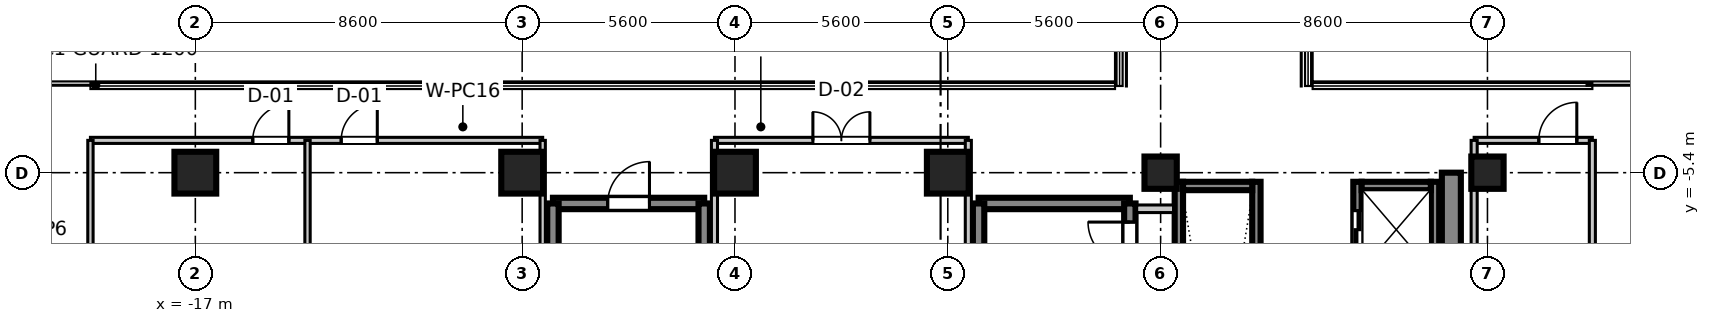
"""IFC4 building model, lengths in metres.
Left out: names, types, materials, properties, quantities, classifications, styles, units other than length and angle.
Written with IfcOpenShell. Run it as: python <this file> out.ifc"""

import sys

from ifc_helpers import new_model, si_unit, direction, frame, frame_2d, origin, origin_2d, place, context, subcontext, project, spatial, rectangle, extrude, source, transform, mapped, element, fill, save


model = new_model("IFC4")
c1 = context("Model", 3, precision=1e-05, world=origin(), true_north=direction((0.0, 1.0)))
c2 = subcontext(c1, "Body", "Model", "MODEL_VIEW")
j1 = project(units=[si_unit("LENGTHUNIT", "METRE"), si_unit("PLANEANGLEUNIT", "RADIAN")], contexts=[c1])
p1 = place(None, origin())
s1 = spatial("IfcSite", under=j1, at=p1, CompositionType="ELEMENT")
p2 = place(p1, origin())
s2 = spatial("IfcBuilding", under=s1, at=p2, CompositionType="ELEMENT")
p3 = place(p2, frame((0.0, 0.0, 185.5)))
s3 = spatial("IfcBuildingStorey", under=s2, at=p3, CompositionType="ELEMENT", Elevation=185.5)
m1 = source(origin(), c2, "Body", "SweptSolid", [
    extrude(rectangle(XDim=1.1, YDim=1.1, at=origin_2d()), origin(), (0.0, 0.0, 1.0), 3.605),
])
for number, where, z_axis, x_axis in (
    (1, (-17.0, -5.4, 0.0), (0.0, 0.0, 1.0), (1.0, 0.0, 0.0)),
    (2, (-8.4, -5.4, 0.0), (0.0, 0.0, 1.0), (1.0, 0.0, 0.0)),
    (3, (-2.8, -5.4, 0.0), (0.0, 0.0, 1.0), (1.0, 0.0, 0.0)),
    (4, (2.8, -5.4, 0.0), (0.0, 0.0, 1.0), (1.0, 0.0, 0.0)),
):
    element("IfcColumn", number, at=place(p3, frame(where, z_axis=z_axis, x_axis=x_axis)), inside=s3, PredefinedType="COLUMN", context=c2, shape_type="MappedRepresentation", body=[
        mapped(m1, transform((0.0, 0.0, 0.0), scale=1.0)),
    ])
m2 = source(origin(), c2, "Body", "SweptSolid", [
    extrude(rectangle(XDim=0.85, YDim=0.85, at=origin_2d()), origin(), (0.0, 0.0, 1.0), 3.605),
])
for number, where, z_axis, x_axis in (
    (5, (8.4, -5.4, 0.0), (0.0, 0.0, 1.0), (1.0, 0.0, 0.0)),
    (6, (17.0, -5.4, 0.0), (0.0, 0.0, 1.0), (1.0, 0.0, 0.0)),
):
    element("IfcColumn", number, at=place(p3, frame(where, z_axis=z_axis, x_axis=x_axis)), inside=s3, PredefinedType="PILASTER", context=c2, shape_type="MappedRepresentation", body=[
        mapped(m2, transform((0.0, 0.0, 0.0), scale=1.0)),
    ])
m3 = source(origin(), c2, "Body", "SweptSolid", [
    extrude(rectangle(XDim=11.6, YDim=0.5, at=frame_2d((5.8, 0.0))), origin(), (0.0, 0.0, 1.0), 3.39),
])
p4 = place(p3, frame((16.05, -17.0, 0.0), z_axis=(0.0, 0.0, 1.0), x_axis=(0.0, 1.0, 0.0)))
e7 = element("IfcWall", 7, at=p4, inside=s3, PredefinedType="SHEAR", context=c2, shape_type="MappedRepresentation", body=[
    mapped(m3, transform((0.0, 0.0, 0.0), scale=1.0)),
])
m4 = source(origin(), c2, "Body", "SweptSolid", [
    extrude(rectangle(XDim=3.98, YDim=0.3, at=frame_2d((1.99, 0.0))), origin(), (0.0, 0.0, 1.0), 3.39),
])
p5 = place(p3, frame((3.61, -6.21, 0.0), z_axis=(0.0, 0.0, 1.0), x_axis=(1.0, 0.0, 0.0)))
e8 = element("IfcWall", 8, at=p5, inside=s3, PredefinedType="SHEAR", context=c2, shape_type="MappedRepresentation", body=[
    mapped(m4, transform((0.0, 0.0, 0.0), scale=1.0)),
])
m5 = source(origin(), c2, "Body", "SweptSolid", [
    extrude(rectangle(XDim=9.38, YDim=0.3, at=frame_2d((4.69, 0.0))), origin(), (0.0, 0.0, 1.0), 3.39),
])
p6 = place(p3, frame((3.61, -15.59, 0.0), z_axis=(0.0, 0.0, 1.0), x_axis=(0.0, 1.0, 0.0)))
e9 = element("IfcWall", 9, at=p6, inside=s3, PredefinedType="SHEAR", context=c2, shape_type="MappedRepresentation", body=[
    mapped(m5, transform((0.0, 0.0, 0.0), scale=1.0)),
])
p7 = place(p3, frame((7.59, -15.59, 0.0), z_axis=(0.0, 0.0, 1.0), x_axis=(0.0, 1.0, 0.0)))
e10 = element("IfcWall", 10, at=p7, inside=s3, PredefinedType="SHEAR", context=c2, shape_type="MappedRepresentation", body=[
    mapped(m5, transform((0.0, 0.0, 0.0), scale=1.0)),
])
p8 = place(p7, frame((7.79, 0.0, 0.0)))
e11 = element("IfcOpeningElement", 11, at=p8, cuts=e10, PredefinedType="OPENING", context=c2, shape_type="SweptSolid", body=[
    extrude(rectangle(XDim=1.1, YDim=2.15, at=frame_2d((0.55, 1.075))), frame((0.0, 0.16, 0.0), z_axis=(0.0, -1.0, 0.0), x_axis=(1.0, 0.0, 0.0)), (0.0, 0.0, 1.0), 0.32),
])
p9 = place(p3, frame((-7.59, -6.21, 0.0), z_axis=(0.0, 0.0, 1.0), x_axis=(1.0, 0.0, 0.0)))
e12 = element("IfcWall", 12, at=p9, inside=s3, PredefinedType="SHEAR", context=c2, shape_type="MappedRepresentation", body=[
    mapped(m4, transform((0.0, 0.0, 0.0), scale=1.0)),
])
p10 = place(p9, frame((1.44, 0.0, 0.0)))
e13 = element("IfcOpeningElement", 13, at=p10, cuts=e12, PredefinedType="OPENING", context=c2, shape_type="SweptSolid", body=[
    extrude(rectangle(XDim=1.1, YDim=2.15, at=frame_2d((0.55, 1.075))), frame((0.0, 0.16, 0.0), z_axis=(0.0, -1.0, 0.0), x_axis=(1.0, 0.0, 0.0)), (0.0, 0.0, 1.0), 0.32),
])
for number, where, z_axis, x_axis in (
    (14, (-7.59, -15.59, 0.0), (0.0, 0.0, 1.0), (0.0, 1.0, 0.0)),
    (15, (-3.61, -15.59, 0.0), (0.0, 0.0, 1.0), (0.0, 1.0, 0.0)),
):
    element("IfcWall", number, at=place(p3, frame(where, z_axis=z_axis, x_axis=x_axis)), inside=s3, PredefinedType="SHEAR", context=c2, shape_type="MappedRepresentation", body=[
        mapped(m5, transform((0.0, 0.0, 0.0), scale=1.0)),
    ])
m6 = source(origin(), c2, "Body", "SweptSolid", [
    extrude(rectangle(XDim=2.36, YDim=0.22, at=frame_2d((1.18, 0.0))), origin(), (0.0, 0.0, 1.0), 3.39),
])
p11 = place(p3, frame((13.58, -8.0, 0.0), z_axis=(0.0, 0.0, 1.0), x_axis=(0.0, 1.0, 0.0)))
e16 = element("IfcWall", 16, at=p11, inside=s3, PredefinedType="SHEAR", context=c2, shape_type="MappedRepresentation", body=[
    mapped(m6, transform((0.0, 0.0, 0.0), scale=1.0)),
])
p12 = place(p11, frame((0.6, 0.0, 0.0)))
e17 = element("IfcOpeningElement", 17, at=p12, cuts=e16, PredefinedType="OPENING", context=c2, shape_type="SweptSolid", body=[
    extrude(rectangle(XDim=1.0, YDim=2.2, at=frame_2d((0.5, 1.1))), frame((0.0, 0.12, 0.0), z_axis=(0.0, -1.0, 0.0), x_axis=(1.0, 0.0, 0.0)), (0.0, 0.0, 1.0), 0.24),
])
p13 = place(p3, frame((15.62, -8.0, 0.0), z_axis=(0.0, 0.0, 1.0), x_axis=(0.0, 1.0, 0.0)))
e18 = element("IfcWall", 18, at=p13, inside=s3, PredefinedType="SHEAR", context=c2, shape_type="MappedRepresentation", body=[
    mapped(m6, transform((0.0, 0.0, 0.0), scale=1.0)),
])
m7 = source(origin(), c2, "Body", "SweptSolid", [
    extrude(rectangle(XDim=1.82, YDim=0.22, at=frame_2d((0.91, 0.0))), origin(), (0.0, 0.0, 1.0), 3.39),
])
p14 = place(p3, frame((13.69, -5.75, 0.0), z_axis=(0.0, 0.0, 1.0), x_axis=(1.0, 0.0, 0.0)))
e19 = element("IfcWall", 19, at=p14, inside=s3, PredefinedType="SHEAR", context=c2, shape_type="MappedRepresentation", body=[
    mapped(m7, transform((0.0, 0.0, 0.0), scale=1.0)),
])
for number, where, z_axis, x_axis in (
    (20, (8.88, -8.0, 0.0), (0.0, 0.0, 1.0), (0.0, 1.0, 0.0)),
    (21, (10.92, -8.0, 0.0), (0.0, 0.0, 1.0), (0.0, 1.0, 0.0)),
):
    element("IfcWall", number, at=place(p3, frame(where, z_axis=z_axis, x_axis=x_axis)), inside=s3, PredefinedType="SHEAR", context=c2, shape_type="MappedRepresentation", body=[
        mapped(m6, transform((0.0, 0.0, 0.0), scale=1.0)),
    ])
p15 = place(p3, frame((8.99, -5.75, 0.0), z_axis=(0.0, 0.0, 1.0), x_axis=(1.0, 0.0, 0.0)))
e22 = element("IfcWall", 22, at=p15, inside=s3, PredefinedType="SHEAR", context=c2, shape_type="MappedRepresentation", body=[
    mapped(m7, transform((0.0, 0.0, 0.0), scale=1.0)),
])
m8 = source(origin(), c2, "Body", "SweptSolid", [
    extrude(rectangle(XDim=0.97, YDim=0.2, at=frame_2d((0.485, 0.0))), origin(), (0.0, 0.0, 1.0), 2.73),
])
p16 = place(p3, frame((7.77, -6.35, 0.0), z_axis=(0.0, 0.0, 1.0), x_axis=(1.0, 0.0, 0.0)))
e23 = element("IfcWall", 23, at=p16, inside=s3, PredefinedType="PARTITIONING", context=c2, shape_type="MappedRepresentation", body=[
    mapped(m8, transform((0.0, 0.0, 0.0), scale=1.0)),
])
m9 = source(origin(), c2, "Body", "SweptSolid", [
    extrude(rectangle(XDim=3.11, YDim=0.16, at=frame_2d((1.555, 0.0))), origin(), (0.0, 0.0, 1.0), 2.73),
])
p17 = place(p3, frame((16.65, -4.55, 0.0), z_axis=(0.0, 0.0, 1.0), x_axis=(1.0, 0.0, 0.0)))
e24 = element("IfcWall", 24, at=p17, inside=s3, PredefinedType="PARTITIONING", context=c2, shape_type="MappedRepresentation", body=[
    mapped(m9, transform((0.0, 0.0, 0.0), scale=1.0)),
])
p18 = place(p17, frame((1.701, 0.0, 0.0)))
e25 = element("IfcOpeningElement", 25, at=p18, cuts=e24, PredefinedType="OPENING", context=c2, shape_type="SweptSolid", body=[
    extrude(rectangle(XDim=1.0, YDim=2.1, at=frame_2d((0.5, 1.05))), frame((0.0, 0.09, 0.0), z_axis=(0.0, -1.0, 0.0), x_axis=(1.0, 0.0, 0.0)), (0.0, 0.0, 1.0), 0.18),
])
m10 = source(origin(), c2, "Body", "SweptSolid", [
    extrude(rectangle(XDim=17.95, YDim=0.16, at=frame_2d((8.975, 0.0))), origin(), (0.0, 0.0, 1.0), 2.73),
])
p19 = place(p3, frame((16.65, -22.5, 0.0), z_axis=(0.0, 0.0, 1.0), x_axis=(0.0, 1.0, 0.0)))
e26 = element("IfcWall", 26, at=p19, inside=s3, PredefinedType="PARTITIONING", context=c2, shape_type="MappedRepresentation", body=[
    mapped(m10, transform((0.0, 0.0, 0.0), scale=1.0)),
])
m11 = source(origin(), c2, "Body", "SweptSolid", [
    extrude(rectangle(XDim=16.53, YDim=0.16, at=frame_2d((8.265, 0.0))), origin(), (0.0, 0.0, 1.0), 2.73),
])
p20 = place(p3, frame((19.76, -21.08, 0.0), z_axis=(0.0, 0.0, 1.0), x_axis=(0.0, 1.0, 0.0)))
e27 = element("IfcWall", 27, at=p20, inside=s3, PredefinedType="PARTITIONING", context=c2, shape_type="MappedRepresentation", body=[
    mapped(m11, transform((0.0, 0.0, 0.0), scale=1.0)),
])
m12 = source(origin(), c2, "Body", "SweptSolid", [
    extrude(rectangle(XDim=11.9, YDim=0.16, at=frame_2d((5.95, 0.0))), origin(), (0.0, 0.0, 1.0), 2.73),
])
p21 = place(p3, frame((-19.76, -4.55, 0.0), z_axis=(0.0, 0.0, 1.0), x_axis=(1.0, 0.0, 0.0)))
e28 = element("IfcWall", 28, at=p21, inside=s3, PredefinedType="PARTITIONING", context=c2, shape_type="MappedRepresentation", body=[
    mapped(m12, transform((0.0, 0.0, 0.0), scale=1.0)),
])
p22 = place(p21, frame((4.271, 0.0, 0.0)))
e29 = element("IfcOpeningElement", 29, at=p22, cuts=e28, PredefinedType="OPENING", context=c2, shape_type="SweptSolid", body=[
    extrude(rectangle(XDim=0.95, YDim=2.1, at=frame_2d((0.475, 1.05))), frame((0.0, 0.09, 0.0), z_axis=(0.0, -1.0, 0.0), x_axis=(1.0, 0.0, 0.0)), (0.0, 0.0, 1.0), 0.18),
])
p23 = place(p21, frame((6.598, 0.0, 0.0)))
e30 = element("IfcOpeningElement", 30, at=p23, cuts=e28, PredefinedType="OPENING", context=c2, shape_type="SweptSolid", body=[
    extrude(rectangle(XDim=0.95, YDim=2.1, at=frame_2d((0.475, 1.05))), frame((0.0, 0.09, 0.0), z_axis=(0.0, -1.0, 0.0), x_axis=(1.0, 0.0, 0.0)), (0.0, 0.0, 1.0), 0.18),
])
m13 = source(origin(), c2, "Body", "SweptSolid", [
    extrude(rectangle(XDim=16.53, YDim=0.14, at=frame_2d((8.265, 0.0))), origin(), (0.0, 0.0, 1.0), 2.73),
])
p24 = place(p3, frame((-19.76, -21.08, 0.0), z_axis=(0.0, 0.0, 1.0), x_axis=(0.0, 1.0, 0.0)))
e31 = element("IfcWall", 31, at=p24, inside=s3, PredefinedType="PARTITIONING", context=c2, shape_type="MappedRepresentation", body=[
    mapped(m13, transform((0.0, 0.0, 0.0), scale=1.0)),
])
m14 = source(origin(), c2, "Body", "SweptSolid", [
    extrude(rectangle(XDim=17.95, YDim=0.14, at=frame_2d((8.975, 0.0))), origin(), (0.0, 0.0, 1.0), 2.73),
])
for number, where, z_axis, x_axis in (
    (32, (-7.86, -22.5, 0.0), (0.0, 0.0, 1.0), (0.0, 1.0, 0.0)),
    (33, (-14.048, -22.5, 0.0), (0.0, 0.0, 1.0), (0.0, 1.0, 0.0)),
):
    element("IfcWall", number, at=place(p3, frame(where, z_axis=z_axis, x_axis=x_axis)), inside=s3, PredefinedType="PARTITIONING", context=c2, shape_type="MappedRepresentation", body=[
        mapped(m14, transform((0.0, 0.0, 0.0), scale=1.0)),
    ])
m15 = source(origin(), c2, "Body", "SweptSolid", [
    extrude(rectangle(XDim=6.68, YDim=0.16, at=frame_2d((3.34, 0.0))), origin(), (0.0, 0.0, 1.0), 2.73),
])
p25 = place(p3, frame((-3.34, -4.55, 0.0), z_axis=(0.0, 0.0, 1.0), x_axis=(1.0, 0.0, 0.0)))
e34 = element("IfcWall", 34, at=p25, inside=s3, PredefinedType="PARTITIONING", context=c2, shape_type="MappedRepresentation", body=[
    mapped(m15, transform((0.0, 0.0, 0.0), scale=1.0)),
])
p26 = place(p25, frame((2.59, 0.0, 0.0)))
e35 = element("IfcOpeningElement", 35, at=p26, cuts=e34, PredefinedType="OPENING", context=c2, shape_type="SweptSolid", body=[
    extrude(rectangle(XDim=1.5, YDim=2.15, at=frame_2d((0.75, 1.075))), frame((0.0, 0.09, 0.0), z_axis=(0.0, -1.0, 0.0), x_axis=(1.0, 0.0, 0.0)), (0.0, 0.0, 1.0), 0.18),
])
for number, where, z_axis, x_axis in (
    (36, (-3.34, -22.5, 0.0), (0.0, 0.0, 1.0), (0.0, 1.0, 0.0)),
    (37, (3.34, -22.5, 0.0), (0.0, 0.0, 1.0), (0.0, 1.0, 0.0)),
):
    element("IfcWall", number, at=place(p3, frame(where, z_axis=z_axis, x_axis=x_axis)), inside=s3, PredefinedType="PARTITIONING", context=c2, shape_type="MappedRepresentation", body=[
        mapped(m10, transform((0.0, 0.0, 0.0), scale=1.0)),
    ])
m16 = source(origin(), c2, "Body", "SweptSolid", [
    extrude(rectangle(XDim=1.1, YDim=2.15, at=frame_2d((0.55, 1.075))), frame((0.0, 0.025, 0.0), z_axis=(0.0, -1.0, 0.0), x_axis=(1.0, 0.0, 0.0)), (0.0, 0.0, 1.0), 0.05),
])
p27 = place(p8, origin())
e38 = element("IfcDoor", 38, at=p27, inside=s3, OperationType="SINGLE_SWING_RIGHT", PredefinedType="DOOR", context=c2, shape_type="MappedRepresentation", body=[
    mapped(m16, transform((0.0, 0.0, 0.0), scale=1.0)),
])
fill(e11, e38)
p28 = place(p10, frame((1.1, 0.0, 0.0), z_axis=(0.0, 0.0, 1.0), x_axis=(-1.0, 0.0, 0.0)))
e39 = element("IfcDoor", 39, at=p28, inside=s3, OperationType="SINGLE_SWING_RIGHT", PredefinedType="DOOR", context=c2, shape_type="MappedRepresentation", body=[
    mapped(m16, transform((0.0, 0.0, 0.0), scale=1.0)),
])
fill(e13, e39)
m17 = source(origin(), c2, "Body", "SweptSolid", [
    extrude(rectangle(XDim=1.0, YDim=2.2, at=frame_2d((0.5, 1.1))), frame((0.0, 0.025, 0.0), z_axis=(0.0, -1.0, 0.0), x_axis=(1.0, 0.0, 0.0)), (0.0, 0.0, 1.0), 0.05),
])
p29 = place(p12, origin())
e40 = element("IfcDoor", 40, at=p29, inside=s3, OperationType="DOUBLE_DOOR_SLIDING", PredefinedType="DOOR", context=c2, shape_type="MappedRepresentation", body=[
    mapped(m17, transform((0.0, 0.0, 0.0), scale=1.0)),
])
fill(e17, e40)
m18 = source(origin(), c2, "Body", "SweptSolid", [
    extrude(rectangle(XDim=1.0, YDim=2.1, at=frame_2d((0.5, 1.05))), frame((0.0, 0.025, 0.0), z_axis=(0.0, -1.0, 0.0), x_axis=(1.0, 0.0, 0.0)), (0.0, 0.0, 1.0), 0.05),
])
p30 = place(p18, frame((1.0, 0.0, 0.0), z_axis=(0.0, 0.0, 1.0), x_axis=(-1.0, 0.0, 0.0)))
e41 = element("IfcDoor", 41, at=p30, inside=s3, OperationType="SINGLE_SWING_RIGHT", PredefinedType="DOOR", context=c2, shape_type="MappedRepresentation", body=[
    mapped(m18, transform((0.0, 0.0, 0.0), scale=1.0)),
])
fill(e25, e41)
m19 = source(origin(), c2, "Body", "SweptSolid", [
    extrude(rectangle(XDim=0.95, YDim=2.1, at=frame_2d((0.475, 1.05))), frame((0.0, 0.025, 0.0), z_axis=(0.0, -1.0, 0.0), x_axis=(1.0, 0.0, 0.0)), (0.0, 0.0, 1.0), 0.05),
])
p31 = place(p22, frame((0.95, 0.0, 0.0), z_axis=(0.0, 0.0, 1.0), x_axis=(-1.0, 0.0, 0.0)))
e42 = element("IfcDoor", 42, at=p31, inside=s3, OperationType="SINGLE_SWING_RIGHT", PredefinedType="DOOR", context=c2, shape_type="MappedRepresentation", body=[
    mapped(m19, transform((0.0, 0.0, 0.0), scale=1.0)),
])
fill(e29, e42)
p32 = place(p23, frame((0.95, 0.0, 0.0), z_axis=(0.0, 0.0, 1.0), x_axis=(-1.0, 0.0, 0.0)))
e43 = element("IfcDoor", 43, at=p32, inside=s3, OperationType="SINGLE_SWING_RIGHT", PredefinedType="DOOR", context=c2, shape_type="MappedRepresentation", body=[
    mapped(m19, transform((0.0, 0.0, 0.0), scale=1.0)),
])
fill(e30, e43)
m20 = source(origin(), c2, "Body", "SweptSolid", [
    extrude(rectangle(XDim=1.5, YDim=2.15, at=frame_2d((0.75, 1.075))), frame((0.0, 0.025, 0.0), z_axis=(0.0, -1.0, 0.0), x_axis=(1.0, 0.0, 0.0)), (0.0, 0.0, 1.0), 0.05),
])
p33 = place(p26, frame((1.5, 0.0, 0.0), z_axis=(0.0, 0.0, 1.0), x_axis=(-1.0, 0.0, 0.0)))
e44 = element("IfcDoor", 44, at=p33, inside=s3, OperationType="DOUBLE_DOOR_SINGLE_SWING", PredefinedType="DOOR", context=c2, shape_type="MappedRepresentation", body=[
    mapped(m20, transform((0.0, 0.0, 0.0), scale=1.0)),
])
fill(e35, e44)
save(model, sys.argv[1])
